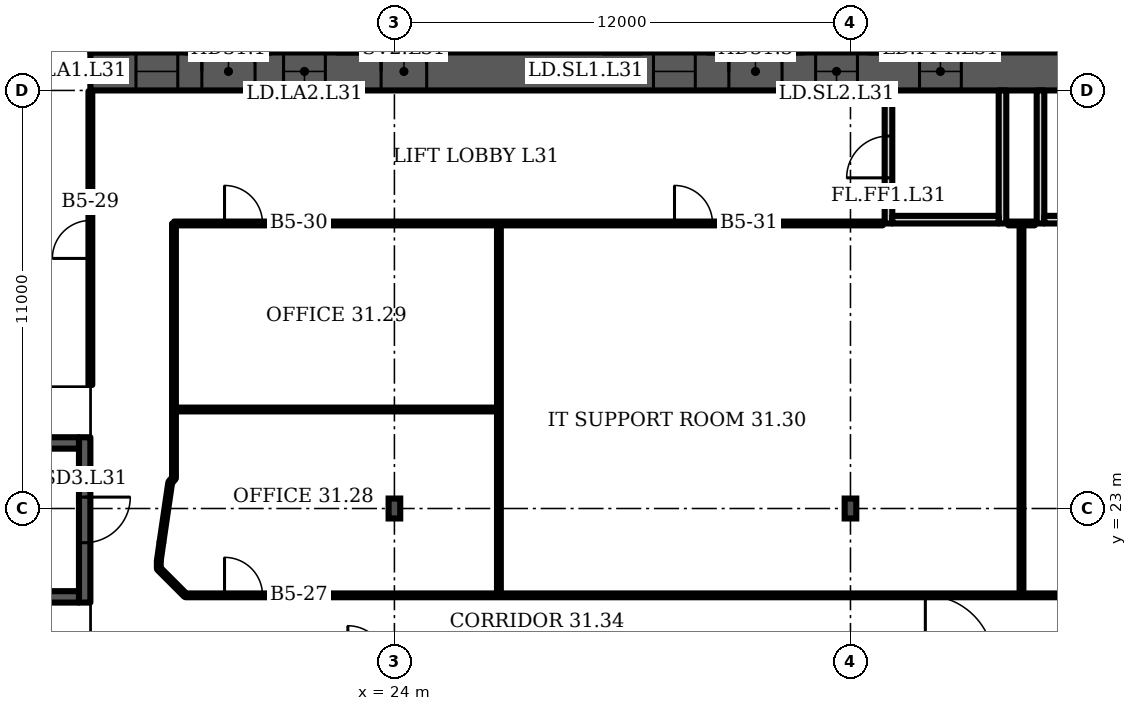
"""IFC4 building model, lengths in metres.
Left out: names, types, materials, properties, quantities, classifications, styles, units other than length and angle.
Written with IfcOpenShell. Run it as: python <this file> out.ifc"""

import sys

from ifc_helpers import new_model, si_unit, direction, frame, frame_2d, origin, origin_2d, place, context, subcontext, project, spatial, rectangle, i_section, extrude, element, fill, save


model = new_model("IFC4")
c1 = context("Model", 3, precision=1e-05, world=origin(), true_north=direction((0.0, 1.0)))
c2 = subcontext(c1, "Body", "Model", "MODEL_VIEW")
j1 = project(units=[si_unit("LENGTHUNIT", "METRE"), si_unit("PLANEANGLEUNIT", "RADIAN")], contexts=[c1])
p1 = place(None, origin())
s1 = spatial("IfcSite", under=j1, at=p1, CompositionType="ELEMENT")
p2 = place(p1, origin())
s2 = spatial("IfcBuilding", under=s1, at=p2, CompositionType="ELEMENT")
p3 = place(p2, frame((0.0, 0.0, 132.7)))
s3 = spatial("IfcBuildingStorey", under=s2, at=p3, CompositionType="ELEMENT", Elevation=132.7)
p4 = place(p3, frame((16.0, 34.5, 0.0), z_axis=(0.0, 0.0, 1.0), x_axis=(1.0, 0.0, 0.0)))
e1 = element("IfcWall", 1, at=p4, inside=s3, PredefinedType="SHEAR", context=c2, shape_type="SweptSolid", body=[
    extrude(rectangle(XDim=49.0, YDim=1.0, at=frame_2d((24.5, 0.0))), origin(), (0.0, 0.0, 1.0), 3.6),
])
p5 = place(p4, frame((1.2, 0.0, 0.0)))
e2 = element("IfcOpeningElement", 2, at=p5, cuts=e1, PredefinedType="OPENING", context=c2, shape_type="SweptSolid", body=[
    extrude(rectangle(XDim=1.1, YDim=2.1, at=frame_2d((0.55, 1.05))), frame((0.0, 0.51, 0.0), z_axis=(0.0, -1.0, 0.0), x_axis=(1.0, 0.0, 0.0)), (0.0, 0.0, 1.0), 1.02),
])
p6 = place(p4, frame((5.083, 0.0, 0.0)))
e3 = element("IfcOpeningElement", 3, at=p6, cuts=e1, PredefinedType="OPENING", context=c2, shape_type="SweptSolid", body=[
    extrude(rectangle(XDim=1.1, YDim=2.1, at=frame_2d((0.55, 1.05))), frame((0.0, 0.51, 0.0), z_axis=(0.0, -1.0, 0.0), x_axis=(1.0, 0.0, 0.0)), (0.0, 0.0, 1.0), 1.02),
])
p7 = place(p4, frame((2.933, 0.0, 0.0)))
e4 = element("IfcOpeningElement", 4, at=p7, cuts=e1, PredefinedType="OPENING", context=c2, shape_type="SweptSolid", body=[
    extrude(rectangle(XDim=1.4, YDim=2.1, at=frame_2d((0.7, 1.05))), frame((0.0, 0.51, 0.0), z_axis=(0.0, -1.0, 0.0), x_axis=(1.0, 0.0, 0.0)), (0.0, 0.0, 1.0), 1.02),
])
p8 = place(p4, frame((7.65, 0.0, 0.0)))
e5 = element("IfcOpeningElement", 5, at=p8, cuts=e1, PredefinedType="OPENING", context=c2, shape_type="SweptSolid", body=[
    extrude(rectangle(XDim=1.2, YDim=2.1, at=frame_2d((0.6, 1.05))), frame((0.0, 0.51, 0.0), z_axis=(0.0, -1.0, 0.0), x_axis=(1.0, 0.0, 0.0)), (0.0, 0.0, 1.0), 1.02),
])
p9 = place(p4, frame((14.817, 0.0, 0.0)))
e6 = element("IfcOpeningElement", 6, at=p9, cuts=e1, PredefinedType="OPENING", context=c2, shape_type="SweptSolid", body=[
    extrude(rectangle(XDim=1.1, YDim=2.1, at=frame_2d((0.55, 1.05))), frame((0.0, 0.51, 0.0), z_axis=(0.0, -1.0, 0.0), x_axis=(1.0, 0.0, 0.0)), (0.0, 0.0, 1.0), 1.02),
])
p10 = place(p4, frame((19.083, 0.0, 0.0)))
e7 = element("IfcOpeningElement", 7, at=p10, cuts=e1, PredefinedType="OPENING", context=c2, shape_type="SweptSolid", body=[
    extrude(rectangle(XDim=1.1, YDim=2.1, at=frame_2d((0.55, 1.05))), frame((0.0, 0.51, 0.0), z_axis=(0.0, -1.0, 0.0), x_axis=(1.0, 0.0, 0.0)), (0.0, 0.0, 1.0), 1.02),
])
p11 = place(p4, frame((16.8, 0.0, 0.0)))
e8 = element("IfcOpeningElement", 8, at=p11, cuts=e1, PredefinedType="OPENING", context=c2, shape_type="SweptSolid", body=[
    extrude(rectangle(XDim=1.4, YDim=2.1, at=frame_2d((0.7, 1.05))), frame((0.0, 0.51, 0.0), z_axis=(0.0, -1.0, 0.0), x_axis=(1.0, 0.0, 0.0)), (0.0, 0.0, 1.0), 1.02),
])
p12 = place(p4, frame((21.817, 0.0, 0.0)))
e9 = element("IfcOpeningElement", 9, at=p12, cuts=e1, PredefinedType="OPENING", context=c2, shape_type="SweptSolid", body=[
    extrude(rectangle(XDim=1.1, YDim=2.1, at=frame_2d((0.55, 1.05))), frame((0.0, 0.51, 0.0), z_axis=(0.0, -1.0, 0.0), x_axis=(1.0, 0.0, 0.0)), (0.0, 0.0, 1.0), 1.02),
])
p13 = place(p4, frame((26.083, 0.0, 0.0)))
e10 = element("IfcOpeningElement", 10, at=p13, cuts=e1, PredefinedType="OPENING", context=c2, shape_type="SweptSolid", body=[
    extrude(rectangle(XDim=1.1, YDim=2.1, at=frame_2d((0.55, 1.05))), frame((0.0, 0.51, 0.0), z_axis=(0.0, -1.0, 0.0), x_axis=(1.0, 0.0, 0.0)), (0.0, 0.0, 1.0), 1.02),
])
p14 = place(p4, frame((33.15, 0.0, 0.0)))
e11 = element("IfcOpeningElement", 11, at=p14, cuts=e1, PredefinedType="OPENING", context=c2, shape_type="SweptSolid", body=[
    extrude(rectangle(XDim=1.2, YDim=2.1, at=frame_2d((0.6, 1.05))), frame((0.0, 0.51, 0.0), z_axis=(0.0, -1.0, 0.0), x_axis=(1.0, 0.0, 0.0)), (0.0, 0.0, 1.0), 1.02),
])
p15 = place(p4, frame((37.8, 0.0, 0.0)))
e12 = element("IfcOpeningElement", 12, at=p15, cuts=e1, PredefinedType="OPENING", context=c2, shape_type="SweptSolid", body=[
    extrude(rectangle(XDim=1.4, YDim=2.1, at=frame_2d((0.7, 1.05))), frame((0.0, 0.51, 0.0), z_axis=(0.0, -1.0, 0.0), x_axis=(1.0, 0.0, 0.0)), (0.0, 0.0, 1.0), 1.02),
])
p16 = place(p4, frame((42.817, 0.0, 0.0)))
e13 = element("IfcOpeningElement", 13, at=p16, cuts=e1, PredefinedType="OPENING", context=c2, shape_type="SweptSolid", body=[
    extrude(rectangle(XDim=1.1, YDim=2.1, at=frame_2d((0.55, 1.05))), frame((0.0, 0.51, 0.0), z_axis=(0.0, -1.0, 0.0), x_axis=(1.0, 0.0, 0.0)), (0.0, 0.0, 1.0), 1.02),
])
p17 = place(p4, frame((46.7, 0.0, 0.0)))
e14 = element("IfcOpeningElement", 14, at=p17, cuts=e1, PredefinedType="OPENING", context=c2, shape_type="SweptSolid", body=[
    extrude(rectangle(XDim=1.1, YDim=2.1, at=frame_2d((0.55, 1.05))), frame((0.0, 0.51, 0.0), z_axis=(0.0, -1.0, 0.0), x_axis=(1.0, 0.0, 0.0)), (0.0, 0.0, 1.0), 1.02),
])
p18 = place(p4, frame((44.667, 0.0, 0.0)))
e15 = element("IfcOpeningElement", 15, at=p18, cuts=e1, PredefinedType="OPENING", context=c2, shape_type="SweptSolid", body=[
    extrude(rectangle(XDim=1.4, YDim=2.1, at=frame_2d((0.7, 1.05))), frame((0.0, 0.51, 0.0), z_axis=(0.0, -1.0, 0.0), x_axis=(1.0, 0.0, 0.0)), (0.0, 0.0, 1.0), 1.02),
])
for number, where, z_axis, x_axis in (
    (16, (24.0, 23.0, 0.0), (0.0, 0.0, 1.0), (1.0, 0.0, 0.0)),
    (17, (36.0, 23.0, 0.0), (0.0, 0.0, 1.0), (1.0, 0.0, 0.0)),
):
    element("IfcColumn", number, at=place(p3, frame(where, z_axis=z_axis, x_axis=x_axis)), inside=s3, PredefinedType="COLUMN", context=c2, shape_type="SweptSolid", body=[
        extrude(i_section(OverallWidth=0.306, OverallDepth=0.524, WebThickness=0.021, FlangeThickness=0.04, FilletRadius=0.027, at=origin_2d()), origin(), (0.0, 0.0, 1.0), 3.6),
    ])
p19 = place(p3, frame((37.0, 30.5, 0.0), z_axis=(0.0, 0.0, 1.0), x_axis=(0.0, 1.0, 0.0)))
e18 = element("IfcWall", 18, at=p19, inside=s3, PredefinedType="PARTITIONING", context=c2, shape_type="SweptSolid", body=[
    extrude(rectangle(XDim=3.5, YDim=0.2, at=frame_2d((1.75, 0.0))), origin(), (0.0, 0.0, 1.0), 3.2),
])
p20 = place(p19, frame((1.2, 0.0, 0.0)))
e19 = element("IfcOpeningElement", 19, at=p20, cuts=e18, PredefinedType="OPENING", context=c2, shape_type="SweptSolid", body=[
    extrude(rectangle(XDim=1.1, YDim=2.1, at=frame_2d((0.55, 1.05))), frame((0.0, 0.11, 0.0), z_axis=(0.0, -1.0, 0.0), x_axis=(1.0, 0.0, 0.0)), (0.0, 0.0, 1.0), 0.22),
])
p21 = place(p3, frame((40.0, 30.5, 0.0), z_axis=(0.0, 0.0, 1.0), x_axis=(0.0, 1.0, 0.0)))
e20 = element("IfcWall", 20, at=p21, inside=s3, PredefinedType="PARTITIONING", context=c2, shape_type="SweptSolid", body=[
    extrude(rectangle(XDim=3.5, YDim=0.2, at=frame_2d((1.75, 0.0))), origin(), (0.0, 0.0, 1.0), 3.2),
])
p22 = place(p3, frame((37.1, 30.6, 0.0), z_axis=(0.0, 0.0, 1.0), x_axis=(1.0, 0.0, 0.0)))
e21 = element("IfcWall", 21, at=p22, inside=s3, PredefinedType="PARTITIONING", context=c2, shape_type="SweptSolid", body=[
    extrude(rectangle(XDim=2.8, YDim=0.2, at=frame_2d((1.4, 0.0))), origin(), (0.0, 0.0, 1.0), 3.2),
])
p23 = place(p3, frame((41.0, 30.5, 0.0), z_axis=(0.0, 0.0, 1.0), x_axis=(0.0, 1.0, 0.0)))
e22 = element("IfcWall", 22, at=p23, inside=s3, PredefinedType="PARTITIONING", context=c2, shape_type="SweptSolid", body=[
    extrude(rectangle(XDim=3.5, YDim=0.2, at=frame_2d((1.75, 0.0))), origin(), (0.0, 0.0, 1.0), 3.2),
])
p24 = place(p3, frame((41.1, 30.6, 0.0), z_axis=(0.0, 0.0, 1.0), x_axis=(1.0, 0.0, 0.0)))
e23 = element("IfcWall", 23, at=p24, inside=s3, PredefinedType="PARTITIONING", context=c2, shape_type="SweptSolid", body=[
    extrude(rectangle(XDim=2.8, YDim=0.2, at=frame_2d((1.4, 0.0))), origin(), (0.0, 0.0, 1.0), 3.2),
])
p25 = place(p3, frame((15.85, 20.525, 0.0), z_axis=(0.0, 0.0, 1.0), x_axis=(0.0, 1.0, 0.0)))
e24 = element("IfcWall", 24, at=p25, inside=s3, PredefinedType="SHEAR", context=c2, shape_type="SweptSolid", body=[
    extrude(rectangle(XDim=4.35, YDim=0.3, at=frame_2d((2.175, 0.0))), origin(), (0.0, 0.0, 1.0), 3.2),
])
p26 = place(p25, frame((1.575, 0.0, 0.0)))
e25 = element("IfcOpeningElement", 25, at=p26, cuts=e24, PredefinedType="OPENING", context=c2, shape_type="SweptSolid", body=[
    extrude(rectangle(XDim=1.2, YDim=2.1, at=frame_2d((0.6, 1.05))), frame((0.0, 0.16, 0.0), z_axis=(0.0, -1.0, 0.0), x_axis=(1.0, 0.0, 0.0)), (0.0, 0.0, 1.0), 0.32),
])
p27 = place(p3, frame((16.0, 26.25, 0.0), z_axis=(0.0, 0.0, 1.0), x_axis=(0.0, 1.0, 0.0)))
e26 = element("IfcWall", 26, at=p27, inside=s3, PredefinedType="PARTITIONING", context=c2, shape_type="SweptSolid", body=[
    extrude(rectangle(XDim=7.73, YDim=0.1, at=frame_2d((3.865, 0.0))), origin(), (0.0, 0.0, 1.0), 3.2),
])
p28 = place(p27, frame((3.33, 0.0, 0.0)))
e27 = element("IfcOpeningElement", 27, at=p28, cuts=e26, PredefinedType="OPENING", context=c2, shape_type="SweptSolid", body=[
    extrude(rectangle(XDim=1.0, YDim=2.1, at=frame_2d((0.5, 1.05))), frame((0.0, 0.06, 0.0), z_axis=(0.0, -1.0, 0.0), x_axis=(1.0, 0.0, 0.0)), (0.0, 0.0, 1.0), 0.12),
])
p29 = place(p3, frame((17.8, 21.42, 0.0), z_axis=(0.0, 0.0, 1.0), x_axis=(0.0, 1.0, 0.0)))
e28 = element("IfcWall", 28, at=p29, inside=s3, PredefinedType="PARTITIONING", context=c2, shape_type="SweptSolid", body=[
    extrude(rectangle(XDim=0.2, YDim=0.1, at=frame_2d((0.1, 0.0))), origin(), (0.0, 0.0, 1.0), 3.2),
])
p30 = place(p3, frame((17.8, 21.62, 0.0), z_axis=(0.0, 0.0, 1.0), x_axis=(0.141559, 0.989927, 0.0)))
e29 = element("IfcWall", 29, at=p30, inside=s3, PredefinedType="PARTITIONING", context=c2, shape_type="SweptSolid", body=[
    extrude(rectangle(XDim=0.495, YDim=0.1, at=frame_2d((0.248, 0.0))), origin(), (0.0, 0.0, 1.0), 3.2),
])
p31 = place(p3, frame((17.87, 22.11, 0.0), z_axis=(0.0, 0.0, 1.0), x_axis=(0.145396, 0.989372, 0.0)))
e30 = element("IfcWall", 30, at=p31, inside=s3, PredefinedType="PARTITIONING", context=c2, shape_type="SweptSolid", body=[
    extrude(rectangle(XDim=1.582, YDim=0.1, at=frame_2d((0.791, 0.0))), origin(), (0.0, 0.0, 1.0), 3.2),
])
p32 = place(p3, frame((18.1, 23.685, 0.0), z_axis=(0.0, 0.0, 1.0), x_axis=(0.65566, 0.755051, 0.0)))
e31 = element("IfcWall", 31, at=p32, inside=s3, PredefinedType="PARTITIONING", context=c2, shape_type="SweptSolid", body=[
    extrude(rectangle(XDim=0.152, YDim=0.1, at=frame_2d((0.076, 0.0))), origin(), (0.0, 0.0, 1.0), 3.2),
])
p33 = place(p3, frame((18.2, 23.8, 0.0), z_axis=(0.0, 0.0, 1.0), x_axis=(0.0, 1.0, 0.0)))
e32 = element("IfcWall", 32, at=p33, inside=s3, PredefinedType="PARTITIONING", context=c2, shape_type="SweptSolid", body=[
    extrude(rectangle(XDim=6.7, YDim=0.1, at=frame_2d((3.35, 0.0))), origin(), (0.0, 0.0, 1.0), 3.2),
])
p34 = place(p3, frame((18.2, 25.605, 0.0), z_axis=(0.0, 0.0, 1.0), x_axis=(1.0, 0.0, 0.0)))
e33 = element("IfcWall", 33, at=p34, inside=s3, PredefinedType="PARTITIONING", context=c2, shape_type="SweptSolid", body=[
    extrude(rectangle(XDim=8.55, YDim=0.1, at=frame_2d((4.275, 0.0))), origin(), (0.0, 0.0, 1.0), 3.2),
])
p35 = place(p3, frame((18.2, 30.5, 0.0), z_axis=(0.0, 0.0, 1.0), x_axis=(1.0, 0.0, 0.0)))
e34 = element("IfcWall", 34, at=p35, inside=s3, PredefinedType="PARTITIONING", context=c2, shape_type="SweptSolid", body=[
    extrude(rectangle(XDim=18.65, YDim=0.1, at=frame_2d((9.325, 0.0))), origin(), (0.0, 0.0, 1.0), 3.2),
])
p36 = place(p35, frame((1.33, 0.0, 0.0)))
e35 = element("IfcOpeningElement", 35, at=p36, cuts=e34, PredefinedType="OPENING", context=c2, shape_type="SweptSolid", body=[
    extrude(rectangle(XDim=1.0, YDim=2.1, at=frame_2d((0.5, 1.05))), frame((0.0, 0.06, 0.0), z_axis=(0.0, -1.0, 0.0), x_axis=(1.0, 0.0, 0.0)), (0.0, 0.0, 1.0), 0.12),
])
p37 = place(p35, frame((13.17, 0.0, 0.0)))
e36 = element("IfcOpeningElement", 36, at=p37, cuts=e34, PredefinedType="OPENING", context=c2, shape_type="SweptSolid", body=[
    extrude(rectangle(XDim=1.0, YDim=2.1, at=frame_2d((0.5, 1.05))), frame((0.0, 0.06, 0.0), z_axis=(0.0, -1.0, 0.0), x_axis=(1.0, 0.0, 0.0)), (0.0, 0.0, 1.0), 0.12),
])
p38 = place(p3, frame((18.505, 20.715, 0.0), z_axis=(0.0, 0.0, 1.0), x_axis=(-0.707107, 0.707107, 0.0)))
e37 = element("IfcWall", 37, at=p38, inside=s3, PredefinedType="PARTITIONING", context=c2, shape_type="SweptSolid", body=[
    extrude(rectangle(XDim=0.997, YDim=0.1, at=frame_2d((0.499, 0.0))), origin(), (0.0, 0.0, 1.0), 3.2),
])
p39 = place(p3, frame((18.505, 20.715, 0.0), z_axis=(0.0, 0.0, 1.0), x_axis=(1.0, 0.0, 0.0)))
e38 = element("IfcWall", 38, at=p39, inside=s3, PredefinedType="PARTITIONING", context=c2, shape_type="SweptSolid", body=[
    extrude(rectangle(XDim=49.385, YDim=0.1, at=frame_2d((24.692, 0.0))), origin(), (0.0, 0.0, 1.0), 3.2),
])
p40 = place(p39, frame((1.025, 0.0, 0.0)))
e39 = element("IfcOpeningElement", 39, at=p40, cuts=e38, PredefinedType="OPENING", context=c2, shape_type="SweptSolid", body=[
    extrude(rectangle(XDim=1.0, YDim=2.1, at=frame_2d((0.5, 1.05))), frame((0.0, 0.06, 0.0), z_axis=(0.0, -1.0, 0.0), x_axis=(1.0, 0.0, 0.0)), (0.0, 0.0, 1.0), 0.12),
])
for number, where, z_axis, x_axis in (
    (40, (26.75, 20.715, 0.0), (0.0, 0.0, 1.0), (0.0, 1.0, 0.0)),
    (41, (40.5, 20.715, 0.0), (0.0, 0.0, 1.0), (0.0, 1.0, 0.0)),
):
    element("IfcWall", number, at=place(p3, frame(where, z_axis=z_axis, x_axis=x_axis)), inside=s3, PredefinedType="PARTITIONING", context=c2, shape_type="SweptSolid", body=[
        extrude(rectangle(XDim=9.785, YDim=0.1, at=frame_2d((4.893, 0.0))), origin(), (0.0, 0.0, 1.0), 3.2),
    ])
p41 = place(p3, frame((40.15, 30.5, 0.0), z_axis=(0.0, 0.0, 1.0), x_axis=(1.0, 0.0, 0.0)))
e42 = element("IfcWall", 42, at=p41, inside=s3, PredefinedType="PARTITIONING", context=c2, shape_type="SweptSolid", body=[
    extrude(rectangle(XDim=0.7, YDim=0.1, at=frame_2d((0.35, 0.0))), origin(), (0.0, 0.0, 1.0), 3.2),
])
for number, where, z_axis, x_axis in (
    (43, (8.2, 20.675, 0.0), (0.0, 0.0, 1.0), (1.0, 0.0, 0.0)),
    (44, (8.2, 24.725, 0.0), (0.0, 0.0, 1.0), (1.0, 0.0, 0.0)),
):
    element("IfcWall", number, at=place(p3, frame(where, z_axis=z_axis, x_axis=x_axis)), inside=s3, PredefinedType="SHEAR", context=c2, shape_type="SweptSolid", body=[
        extrude(rectangle(XDim=7.5, YDim=0.3, at=frame_2d((3.75, 0.0))), origin(), (0.0, 0.0, 1.0), 3.2),
    ])
p42 = place(p5, origin())
e45 = element("IfcDoor", 45, at=p42, inside=s3, OperationType="DOUBLE_DOOR_SLIDING", PredefinedType="DOOR", context=c2, shape_type="SweptSolid", body=[
    extrude(rectangle(XDim=1.1, YDim=2.1, at=frame_2d((0.55, 1.05))), frame((0.0, 0.025, 0.0), z_axis=(0.0, -1.0, 0.0), x_axis=(1.0, 0.0, 0.0)), (0.0, 0.0, 1.0), 0.05),
])
fill(e2, e45)
p43 = place(p6, origin())
e46 = element("IfcDoor", 46, at=p43, inside=s3, OperationType="DOUBLE_DOOR_SLIDING", PredefinedType="DOOR", context=c2, shape_type="SweptSolid", body=[
    extrude(rectangle(XDim=1.1, YDim=2.1, at=frame_2d((0.55, 1.05))), frame((0.0, 0.025, 0.0), z_axis=(0.0, -1.0, 0.0), x_axis=(1.0, 0.0, 0.0)), (0.0, 0.0, 1.0), 0.05),
])
fill(e3, e46)
p44 = place(p7, origin())
e47 = element("IfcDoor", 47, at=p44, inside=s3, OperationType="DOUBLE_DOOR_SINGLE_SWING", PredefinedType="DOOR", context=c2, shape_type="SweptSolid", body=[
    extrude(rectangle(XDim=1.4, YDim=2.1, at=frame_2d((0.7, 1.05))), frame((0.0, 0.025, 0.0), z_axis=(0.0, -1.0, 0.0), x_axis=(1.0, 0.0, 0.0)), (0.0, 0.0, 1.0), 0.05),
])
fill(e4, e47)
p45 = place(p8, origin())
e48 = element("IfcDoor", 48, at=p45, inside=s3, OperationType="SINGLE_SWING_LEFT", PredefinedType="DOOR", context=c2, shape_type="SweptSolid", body=[
    extrude(rectangle(XDim=1.2, YDim=2.1, at=frame_2d((0.6, 1.05))), frame((0.0, 0.025, 0.0), z_axis=(0.0, -1.0, 0.0), x_axis=(1.0, 0.0, 0.0)), (0.0, 0.0, 1.0), 0.05),
])
fill(e5, e48)
p46 = place(p9, origin())
e49 = element("IfcDoor", 49, at=p46, inside=s3, OperationType="DOUBLE_DOOR_SLIDING", PredefinedType="DOOR", context=c2, shape_type="SweptSolid", body=[
    extrude(rectangle(XDim=1.1, YDim=2.1, at=frame_2d((0.55, 1.05))), frame((0.0, 0.025, 0.0), z_axis=(0.0, -1.0, 0.0), x_axis=(1.0, 0.0, 0.0)), (0.0, 0.0, 1.0), 0.05),
])
fill(e6, e49)
p47 = place(p10, origin())
e50 = element("IfcDoor", 50, at=p47, inside=s3, OperationType="DOUBLE_DOOR_SLIDING", PredefinedType="DOOR", context=c2, shape_type="SweptSolid", body=[
    extrude(rectangle(XDim=1.1, YDim=2.1, at=frame_2d((0.55, 1.05))), frame((0.0, 0.025, 0.0), z_axis=(0.0, -1.0, 0.0), x_axis=(1.0, 0.0, 0.0)), (0.0, 0.0, 1.0), 0.05),
])
fill(e7, e50)
p48 = place(p11, origin())
e51 = element("IfcDoor", 51, at=p48, inside=s3, OperationType="DOUBLE_DOOR_SINGLE_SWING", PredefinedType="DOOR", context=c2, shape_type="SweptSolid", body=[
    extrude(rectangle(XDim=1.4, YDim=2.1, at=frame_2d((0.7, 1.05))), frame((0.0, 0.025, 0.0), z_axis=(0.0, -1.0, 0.0), x_axis=(1.0, 0.0, 0.0)), (0.0, 0.0, 1.0), 0.05),
])
fill(e8, e51)
p49 = place(p12, origin())
e52 = element("IfcDoor", 52, at=p49, inside=s3, OperationType="DOUBLE_DOOR_SLIDING", PredefinedType="DOOR", context=c2, shape_type="SweptSolid", body=[
    extrude(rectangle(XDim=1.1, YDim=2.1, at=frame_2d((0.55, 1.05))), frame((0.0, 0.025, 0.0), z_axis=(0.0, -1.0, 0.0), x_axis=(1.0, 0.0, 0.0)), (0.0, 0.0, 1.0), 0.05),
])
fill(e9, e52)
p50 = place(p20, origin())
e53 = element("IfcDoor", 53, at=p50, inside=s3, OperationType="SINGLE_SWING_LEFT", PredefinedType="DOOR", context=c2, shape_type="SweptSolid", body=[
    extrude(rectangle(XDim=1.1, YDim=2.1, at=frame_2d((0.55, 1.05))), frame((0.0, 0.025, 0.0), z_axis=(0.0, -1.0, 0.0), x_axis=(1.0, 0.0, 0.0)), (0.0, 0.0, 1.0), 0.05),
])
fill(e19, e53)
p51 = place(p26, origin())
e54 = element("IfcDoor", 54, at=p51, inside=s3, OperationType="SINGLE_SWING_RIGHT", PredefinedType="DOOR", context=c2, shape_type="SweptSolid", body=[
    extrude(rectangle(XDim=1.2, YDim=2.1, at=frame_2d((0.6, 1.05))), frame((0.0, 0.025, 0.0), z_axis=(0.0, -1.0, 0.0), x_axis=(1.0, 0.0, 0.0)), (0.0, 0.0, 1.0), 0.05),
])
fill(e25, e54)
p52 = place(p40, origin())
e55 = element("IfcDoor", 55, at=p52, inside=s3, OperationType="SINGLE_SWING_LEFT", PredefinedType="DOOR", context=c2, shape_type="SweptSolid", body=[
    extrude(rectangle(XDim=1.0, YDim=2.1, at=frame_2d((0.5, 1.05))), frame((0.0, 0.025, 0.0), z_axis=(0.0, -1.0, 0.0), x_axis=(1.0, 0.0, 0.0)), (0.0, 0.0, 1.0), 0.05),
])
fill(e39, e55)
p53 = place(p28, origin())
e56 = element("IfcDoor", 56, at=p53, inside=s3, OperationType="SINGLE_SWING_LEFT", PredefinedType="DOOR", context=c2, shape_type="SweptSolid", body=[
    extrude(rectangle(XDim=1.0, YDim=2.1, at=frame_2d((0.5, 1.05))), frame((0.0, 0.025, 0.0), z_axis=(0.0, -1.0, 0.0), x_axis=(1.0, 0.0, 0.0)), (0.0, 0.0, 1.0), 0.05),
])
fill(e27, e56)
p54 = place(p36, origin())
e57 = element("IfcDoor", 57, at=p54, inside=s3, OperationType="SINGLE_SWING_LEFT", PredefinedType="DOOR", context=c2, shape_type="SweptSolid", body=[
    extrude(rectangle(XDim=1.0, YDim=2.1, at=frame_2d((0.5, 1.05))), frame((0.0, 0.025, 0.0), z_axis=(0.0, -1.0, 0.0), x_axis=(1.0, 0.0, 0.0)), (0.0, 0.0, 1.0), 0.05),
])
fill(e35, e57)
p55 = place(p37, origin())
e58 = element("IfcDoor", 58, at=p55, inside=s3, OperationType="SINGLE_SWING_LEFT", PredefinedType="DOOR", context=c2, shape_type="SweptSolid", body=[
    extrude(rectangle(XDim=1.0, YDim=2.1, at=frame_2d((0.5, 1.05))), frame((0.0, 0.025, 0.0), z_axis=(0.0, -1.0, 0.0), x_axis=(1.0, 0.0, 0.0)), (0.0, 0.0, 1.0), 0.05),
])
fill(e36, e58)
save(model, sys.argv[1])
